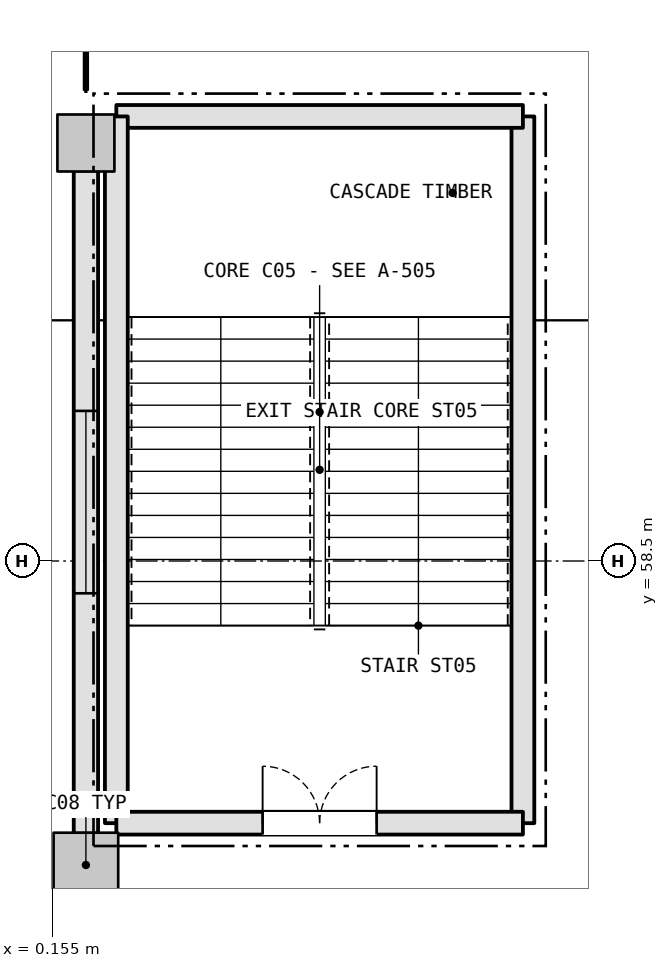
"""IFC4 building model, lengths in metres.
Left out: names, types, materials, properties, quantities, classifications, styles, units other than length and angle.
Written with IfcOpenShell. Run it as: python <this file> out.ifc"""

import sys

from ifc_helpers import new_model, si_unit, direction, frame, frame_2d, origin, origin_2d, place, context, subcontext, project, spatial, rectangle, extrude, element, fill, save


model = new_model("IFC4")
c1 = context("Model", 3, precision=1e-05, world=origin(), true_north=direction((0.0, 1.0)))
c2 = subcontext(c1, "Body", "Model", "MODEL_VIEW")
j1 = project(units=[si_unit("LENGTHUNIT", "METRE"), si_unit("PLANEANGLEUNIT", "RADIAN")], contexts=[c1])
p1 = place(None, origin())
s1 = spatial("IfcSite", under=j1, at=p1, CompositionType="ELEMENT")
p2 = place(p1, origin())
s2 = spatial("IfcBuilding", under=s1, at=p2, CompositionType="ELEMENT")
p3 = place(p2, frame((0.0, 0.0, 5.4)))
s3 = spatial("IfcBuildingStorey", under=s2, at=p3, CompositionType="ELEMENT", Elevation=5.4)
p4 = place(p3, frame((0.6, 54.5, 0.0), z_axis=(0.0, 0.0, 1.0), x_axis=(1.0, 0.0, 0.0)))
e1 = element("IfcColumn", 1, at=p4, inside=s3, PredefinedType="COLUMN", context=c2, shape_type="SweptSolid", body=[
    extrude(rectangle(XDim=0.85, YDim=0.85, at=origin_2d()), origin(), (0.0, 0.0, 1.0), 5.4),
])
p5 = place(p3, frame((0.6, 64.0, 0.0), z_axis=(0.0, 0.0, 1.0), x_axis=(1.0, 0.0, 0.0)))
e2 = element("IfcColumn", 2, at=p5, inside=s3, PredefinedType="COLUMN", context=c2, shape_type="SweptSolid", body=[
    extrude(rectangle(XDim=0.75, YDim=0.75, at=origin_2d()), origin(), (0.0, 0.0, 1.0), 5.4),
])
p6 = place(p3, frame((0.6, 54.913, 0.0), z_axis=(0.0, 0.0, 1.0), x_axis=(0.0, 1.0, 0.0)))
e3 = element("IfcWall", 3, at=p6, inside=s3, PredefinedType="SOLIDWALL", context=c2, shape_type="SweptSolid", body=[
    extrude(rectangle(XDim=8.724, YDim=0.32, at=frame_2d((4.362, 0.0))), origin(), (0.0, 0.0, 1.0), 4.475),
])
p7 = place(p6, frame((3.162, 0.0, 1.05)))
e4 = element("IfcOpeningElement", 4, at=p7, cuts=e3, PredefinedType="OPENING", context=c2, shape_type="SweptSolid", body=[
    extrude(rectangle(XDim=2.4, YDim=2.1, at=frame_2d((1.2, 1.05))), frame((0.0, 0.17, 0.0), z_axis=(0.0, -1.0, 0.0), x_axis=(1.0, 0.0, 0.0)), (0.0, 0.0, 1.0), 0.34),
])
p8 = place(p3, frame((6.35, 55.05, 0.0), z_axis=(0.0, 0.0, 1.0), x_axis=(0.0, 1.0, 0.0)))
e5 = element("IfcWall", 5, at=p8, inside=s3, PredefinedType="SHEAR", context=c2, shape_type="SweptSolid", body=[
    extrude(rectangle(XDim=9.299, YDim=0.3, at=frame_2d((4.65, 0.0))), origin(), (0.0, 0.0, 1.0), 5.14),
])
p9 = place(p3, frame((6.35, 64.35, 0.0), z_axis=(0.0, 0.0, 1.0), x_axis=(-1.0, 0.0, 0.0)))
e6 = element("IfcWall", 6, at=p9, inside=s3, PredefinedType="SHEAR", context=c2, shape_type="SweptSolid", body=[
    extrude(rectangle(XDim=5.349, YDim=0.3, at=frame_2d((2.675, 0.0))), origin(), (0.0, 0.0, 1.0), 5.14),
])
p10 = place(p3, frame((1.0, 64.35, 0.0), z_axis=(0.0, 0.0, 1.0), x_axis=(0.0, -1.0, 0.0)))
e7 = element("IfcWall", 7, at=p10, inside=s3, PredefinedType="SHEAR", context=c2, shape_type="SweptSolid", body=[
    extrude(rectangle(XDim=9.299, YDim=0.3, at=frame_2d((4.65, 0.0))), origin(), (0.0, 0.0, 1.0), 5.14),
])
p11 = place(p3, frame((1.0, 55.05, 0.0), z_axis=(0.0, 0.0, 1.0), x_axis=(1.0, 0.0, 0.0)))
e8 = element("IfcWall", 8, at=p11, inside=s3, PredefinedType="SHEAR", context=c2, shape_type="SweptSolid", body=[
    extrude(rectangle(XDim=5.349, YDim=0.3, at=frame_2d((2.675, 0.0))), origin(), (0.0, 0.0, 1.0), 5.14),
])
p12 = place(p11, frame((1.925, 0.0, 0.0)))
e9 = element("IfcOpeningElement", 9, at=p12, cuts=e8, PredefinedType="OPENING", context=c2, shape_type="SweptSolid", body=[
    extrude(rectangle(XDim=1.5, YDim=2.2, at=frame_2d((0.75, 1.1))), frame((0.0, 0.16, 0.0), z_axis=(0.0, -1.0, 0.0), x_axis=(1.0, 0.0, 0.0)), (0.0, 0.0, 1.0), 0.32),
])
p13 = place(p7, origin())
e10 = element("IfcWindow", 10, at=p13, inside=s3, PartitioningType="SINGLE_PANEL", PredefinedType="WINDOW", context=c2, shape_type="SweptSolid", body=[
    extrude(rectangle(XDim=2.4, YDim=2.1, at=frame_2d((1.2, 1.05))), frame((0.0, 0.03, 0.0), z_axis=(0.0, -1.0, 0.0), x_axis=(1.0, 0.0, 0.0)), (0.0, 0.0, 1.0), 0.06),
])
fill(e4, e10)
p14 = place(p12, origin())
e11 = element("IfcDoor", 11, at=p14, inside=s3, OperationType="DOUBLE_DOOR_SINGLE_SWING", PredefinedType="DOOR", context=c2, shape_type="SweptSolid", body=[
    extrude(rectangle(XDim=1.5, YDim=2.2, at=frame_2d((0.75, 1.1))), frame((0.0, 0.025, 0.0), z_axis=(0.0, -1.0, 0.0), x_axis=(1.0, 0.0, 0.0)), (0.0, 0.0, 1.0), 0.05),
])
fill(e9, e11)
save(model, sys.argv[1])
